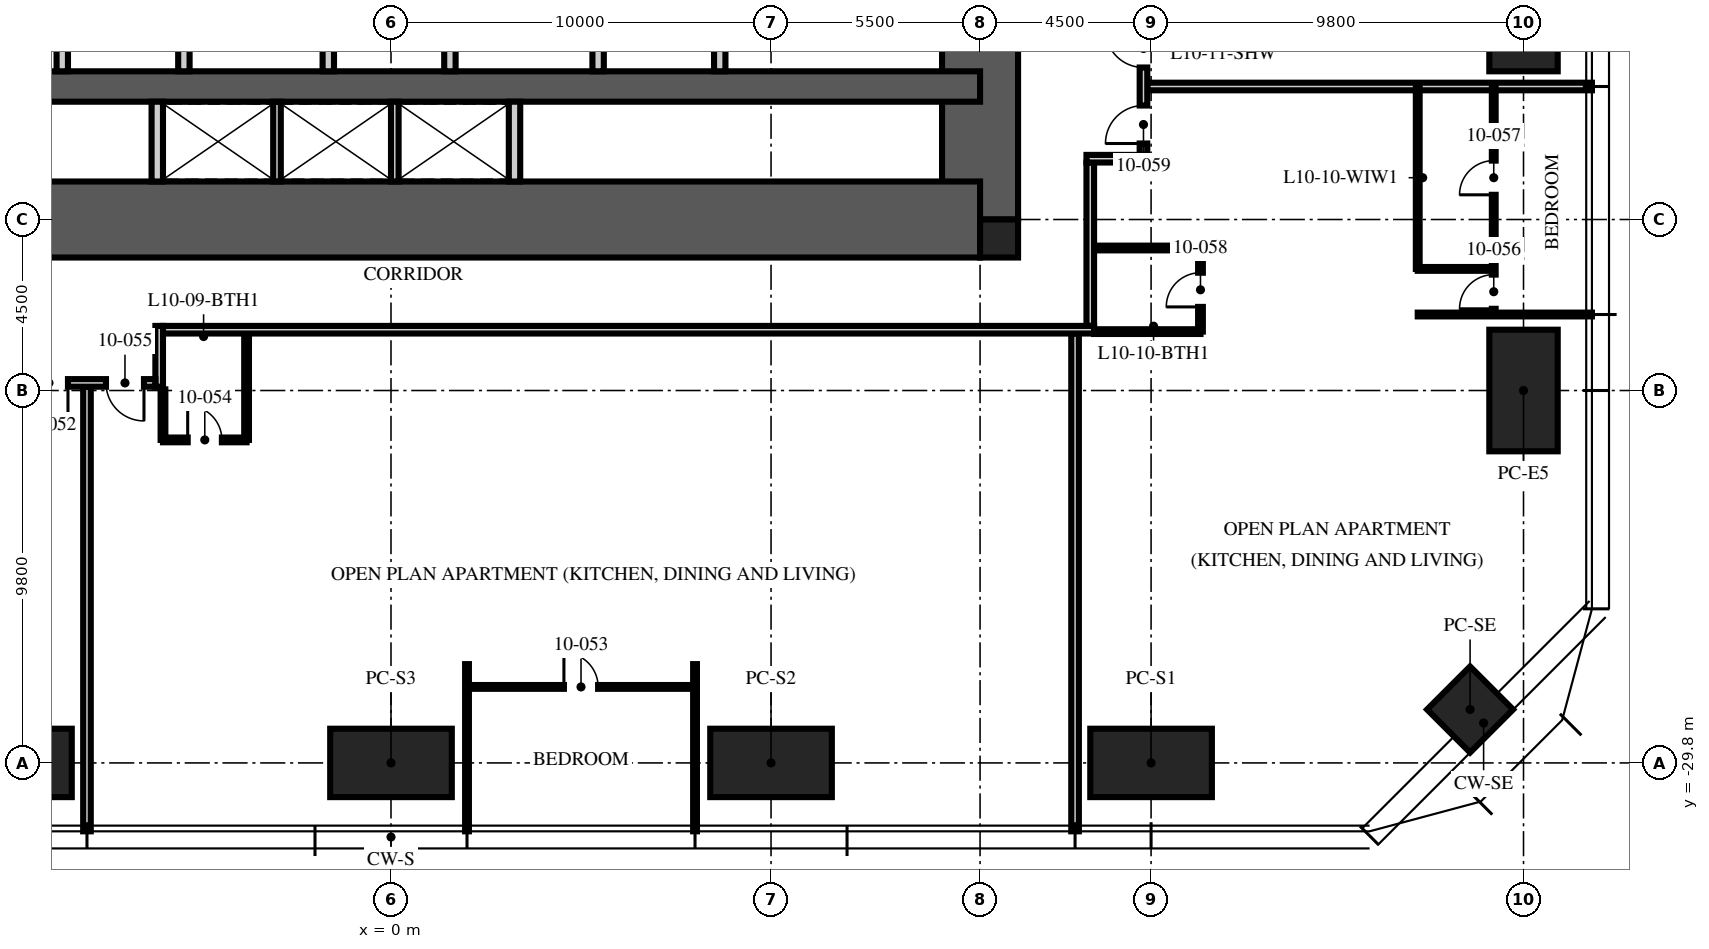
"""IFC4 building model, lengths in metres.
Left out: names, types, materials, properties, quantities, classifications, styles, units other than length and angle.
Written with IfcOpenShell. Run it as: python <this file> out.ifc"""

import sys

from ifc_helpers import new_model, si_unit, direction, frame, frame_2d, origin, origin_2d, place, context, subcontext, project, spatial, rectangle, hollow_rectangle, extrude, element, fill, save


model = new_model("IFC4")
c1 = context("Model", 3, precision=1e-05, world=origin(), true_north=direction((0.0, 1.0)))
c2 = subcontext(c1, "Body", "Model", "MODEL_VIEW")
j1 = project(units=[si_unit("LENGTHUNIT", "METRE"), si_unit("PLANEANGLEUNIT", "RADIAN")], contexts=[c1])
p1 = place(None, origin())
s1 = spatial("IfcSite", under=j1, at=p1, CompositionType="ELEMENT")
p2 = place(p1, origin())
s2 = spatial("IfcBuilding", under=s1, at=p2, CompositionType="ELEMENT")
p3 = place(p2, frame((0.0, 0.0, 43.5)))
s3 = spatial("IfcBuildingStorey", under=s2, at=p3, CompositionType="ELEMENT", Elevation=43.5)
p4 = place(p3, frame((15.5, -15.5, -0.25), z_axis=(0.0, 0.0, 1.0), x_axis=(0.0, 1.0, 0.0)))
e1 = element("IfcWall", 1, at=p4, inside=s3, PredefinedType="SHEAR", context=c2, shape_type="SweptSolid", body=[
    extrude(rectangle(XDim=31.0, YDim=2.0, at=frame_2d((15.5, 0.0))), origin(), (0.0, 0.0, 1.0), 3.75),
])
p5 = place(p4, frame((6.5, 0.0, 0.25)))
e2 = element("IfcOpeningElement", 2, at=p5, cuts=e1, PredefinedType="OPENING", context=c2, shape_type="SweptSolid", body=[
    extrude(rectangle(XDim=1.2, YDim=2.1, at=frame_2d((0.6, 1.05))), frame((0.0, 1.01, 0.0), z_axis=(0.0, -1.0, 0.0), x_axis=(1.0, 0.0, 0.0)), (0.0, 0.0, 1.0), 2.02),
])
p6 = place(p4, frame((23.0, 0.0, 0.25)))
e3 = element("IfcOpeningElement", 3, at=p6, cuts=e1, PredefinedType="OPENING", context=c2, shape_type="SweptSolid", body=[
    extrude(rectangle(XDim=1.8, YDim=2.1, at=frame_2d((0.9, 1.05))), frame((0.0, 1.01, 0.0), z_axis=(0.0, -1.0, 0.0), x_axis=(1.0, 0.0, 0.0)), (0.0, 0.0, 1.0), 2.02),
])
p7 = place(p3, frame((-15.5, -15.5, -0.25), z_axis=(0.0, 0.0, 1.0), x_axis=(1.0, 0.0, 0.0)))
e4 = element("IfcWall", 4, at=p7, inside=s3, PredefinedType="SHEAR", context=c2, shape_type="SweptSolid", body=[
    extrude(rectangle(XDim=31.0, YDim=2.0, at=frame_2d((15.5, 0.0))), origin(), (0.0, 0.0, 1.0), 3.75),
])
p8 = place(p3, frame((-15.5, -12.0, -0.25), z_axis=(0.0, 0.0, 1.0), x_axis=(1.0, 0.0, 0.0)))
e5 = element("IfcWall", 5, at=p8, inside=s3, PredefinedType="SHEAR", context=c2, shape_type="SweptSolid", body=[
    extrude(rectangle(XDim=31.0, YDim=0.8, at=frame_2d((15.5, 0.0))), origin(), (0.0, 0.0, 1.0), 3.75),
])
p9 = place(p3, frame((16.0, -16.0, -0.25), z_axis=(0.0, 0.0, 1.0), x_axis=(1.0, 0.0, 0.0)))
e6 = element("IfcColumn", 6, at=p9, inside=s3, PredefinedType="COLUMN", context=c2, shape_type="SweptSolid", body=[
    extrude(rectangle(XDim=1.0, YDim=1.0, at=origin_2d()), origin(), (0.0, 0.0, 1.0), 3.75),
])
for number, where, z_axis, x_axis in (
    (7, (29.8, -10.0, 0.0), (0.0, 0.0, 1.0), (0.0, 1.0, 0.0)),
    (8, (29.8, -20.0, 0.0), (0.0, 0.0, 1.0), (0.0, 1.0, 0.0)),
    (9, (20.0, -29.8, 0.0), (0.0, 0.0, 1.0), (1.0, 0.0, 0.0)),
    (10, (10.0, -29.8, 0.0), (0.0, 0.0, 1.0), (1.0, 0.0, 0.0)),
    (11, (0.0, -29.8, 0.0), (0.0, 0.0, 1.0), (1.0, 0.0, 0.0)),
    (12, (-10.0, -29.8, 0.0), (0.0, 0.0, 1.0), (1.0, 0.0, 0.0)),
):
    element("IfcColumn", number, at=place(p3, frame(where, z_axis=z_axis, x_axis=x_axis)), inside=s3, PredefinedType="COLUMN", context=c2, shape_type="SweptSolid", body=[
        extrude(hollow_rectangle(XDim=3.2, YDim=1.8, WallThickness=0.2, at=origin_2d()), origin(), (0.0, 0.0, 1.0), 3.75),
    ])
p10 = place(p3, frame((28.394, -28.394, 0.0), z_axis=(0.0, 0.0, 1.0), x_axis=(0.707106781187, 0.707106781187, 0.0)))
e13 = element("IfcColumn", 13, at=p10, inside=s3, PredefinedType="COLUMN", context=c2, shape_type="SweptSolid", body=[
    extrude(hollow_rectangle(XDim=1.6, YDim=1.6, WallThickness=0.1, at=origin_2d()), origin(), (0.0, 0.0, 1.0), 3.75),
])
p11 = place(p3, frame((-8.65, -11.6, 0.0), z_axis=(0.0, 0.0, 1.0), x_axis=(0.0, 1.0, 0.0)))
e14 = element("IfcWall", 14, at=p11, inside=s3, PredefinedType="PARTITIONING", context=c2, shape_type="SweptSolid", body=[
    extrude(rectangle(XDim=6.7, YDim=0.3, at=frame_2d((3.35, 0.0))), origin(), (0.0, 0.0, 1.0), 3.5),
])
p12 = place(p11, frame((2.85, 0.0, 0.0)))
e15 = element("IfcOpeningElement", 15, at=p12, cuts=e14, PredefinedType="OPENING", context=c2, shape_type="SweptSolid", body=[
    extrude(rectangle(XDim=1.1, YDim=2.1, at=frame_2d((0.55, 1.05))), frame((0.0, 0.16, 0.0), z_axis=(0.0, -1.0, 0.0), x_axis=(1.0, 0.0, 0.0)), (0.0, 0.0, 1.0), 0.32),
])
p13 = place(p3, frame((8.65, -11.6, 0.0), z_axis=(0.0, 0.0, 1.0), x_axis=(0.0, 1.0, 0.0)))
e16 = element("IfcWall", 16, at=p13, inside=s3, PredefinedType="PARTITIONING", context=c2, shape_type="SweptSolid", body=[
    extrude(rectangle(XDim=6.7, YDim=0.3, at=frame_2d((3.35, 0.0))), origin(), (0.0, 0.0, 1.0), 3.5),
])
p14 = place(p13, frame((2.85, 0.0, 0.0)))
e17 = element("IfcOpeningElement", 17, at=p14, cuts=e16, PredefinedType="OPENING", context=c2, shape_type="SweptSolid", body=[
    extrude(rectangle(XDim=1.1, YDim=2.1, at=frame_2d((0.55, 1.05))), frame((0.0, 0.16, 0.0), z_axis=(0.0, -1.0, 0.0), x_axis=(1.0, 0.0, 0.0)), (0.0, 0.0, 1.0), 0.32),
])
for number, where, z_axis, x_axis in (
    (18, (-5.45, -11.6, 0.0), (0.0, 0.0, 1.0), (0.0, 1.0, 0.0)),
    (19, (-1.65, -11.6, 0.0), (0.0, 0.0, 1.0), (0.0, 1.0, 0.0)),
    (20, (1.55, -11.6, 0.0), (0.0, 0.0, 1.0), (0.0, 1.0, 0.0)),
    (21, (5.45, -11.6, 0.0), (0.0, 0.0, 1.0), (0.0, 1.0, 0.0)),
):
    element("IfcWall", number, at=place(p3, frame(where, z_axis=z_axis, x_axis=x_axis)), inside=s3, PredefinedType="PARTITIONING", context=c2, shape_type="SweptSolid", body=[
        extrude(rectangle(XDim=4.8, YDim=0.3, at=frame_2d((2.4, 0.0))), origin(), (0.0, 0.0, 1.0), 3.5),
    ])
for number, where, z_axis, x_axis in (
    (22, (-6.15, -14.5, 0.0), (0.0, 0.0, 1.0), (0.0, 1.0, 0.0)),
    (23, (3.25, -14.5, 0.0), (0.0, 0.0, 1.0), (0.0, 1.0, 0.0)),
):
    element("IfcWall", number, at=place(p3, frame(where, z_axis=z_axis, x_axis=x_axis)), inside=s3, PredefinedType="PARTITIONING", context=c2, shape_type="SweptSolid", body=[
        extrude(rectangle(XDim=2.1, YDim=0.3, at=frame_2d((1.05, 0.0))), origin(), (0.0, 0.0, 1.0), 3.5),
    ])
for number, where, z_axis, x_axis in (
    (24, (-3.0, -14.5, 0.0), (0.0, 0.0, 1.0), (0.0, 1.0, 0.0)),
    (25, (0.1, -14.5, 0.0), (0.0, 0.0, 1.0), (0.0, 1.0, 0.0)),
):
    element("IfcWall", number, at=place(p3, frame(where, z_axis=z_axis, x_axis=x_axis)), inside=s3, PredefinedType="PARTITIONING", context=c2, shape_type="SweptSolid", body=[
        extrude(rectangle(XDim=2.1, YDim=0.2, at=frame_2d((1.05, 0.0))), origin(), (0.0, 0.0, 1.0), 3.5),
    ])
p15 = place(p3, frame((-8.0, -19.9, 0.0), z_axis=(0.0, 0.0, 1.0), x_axis=(0.0, -1.0, 0.0)))
e26 = element("IfcWall", 26, at=p15, inside=s3, PredefinedType="PARTITIONING", context=c2, shape_type="SweptSolid", body=[
    extrude(rectangle(XDim=11.7, YDim=0.2, at=frame_2d((5.85, 0.0))), origin(), (0.0, 0.0, 1.0), 2.71),
])
for number, where, z_axis, x_axis in (
    (27, (2.0, -27.2, 0.0), (0.0, 0.0, 1.0), (0.0, -1.0, 0.0)),
    (28, (8.0, -27.2, 0.0), (0.0, 0.0, 1.0), (0.0, -1.0, 0.0)),
):
    element("IfcWall", number, at=place(p3, frame(where, z_axis=z_axis, x_axis=x_axis)), inside=s3, PredefinedType="PARTITIONING", context=c2, shape_type="SweptSolid", body=[
        extrude(rectangle(XDim=4.4, YDim=0.1, at=frame_2d((2.2, 0.0))), origin(), (0.0, 0.0, 1.0), 2.71),
    ])
p16 = place(p3, frame((18.0, -18.5, 0.0), z_axis=(0.0, 0.0, 1.0), x_axis=(0.0, -1.0, 0.0)))
e29 = element("IfcWall", 29, at=p16, inside=s3, PredefinedType="PARTITIONING", context=c2, shape_type="SweptSolid", body=[
    extrude(rectangle(XDim=13.1, YDim=0.2, at=frame_2d((6.55, 0.0))), origin(), (0.0, 0.0, 1.0), 2.3),
])
p17 = place(p3, frame((27.017, -18.0, 0.0), z_axis=(0.0, 0.0, 1.0), x_axis=(1.0, 0.0, 0.0)))
e30 = element("IfcWall", 30, at=p17, inside=s3, PredefinedType="PARTITIONING", context=c2, shape_type="SweptSolid", body=[
    extrude(rectangle(XDim=4.583, YDim=0.1, at=frame_2d((2.292, 0.0))), origin(), (0.0, 0.0, 1.0), 2.71),
])
p18 = place(p3, frame((19.9, -12.0, 0.0), z_axis=(0.0, 0.0, 1.0), x_axis=(1.0, 0.0, 0.0)))
e31 = element("IfcWall", 31, at=p18, inside=s3, PredefinedType="PARTITIONING", context=c2, shape_type="SweptSolid", body=[
    extrude(rectangle(XDim=11.7, YDim=0.2, at=frame_2d((5.85, 0.0))), origin(), (0.0, 0.0, 1.0), 2.71),
])
p19 = place(p3, frame((2.0, -27.8, 0.0), z_axis=(0.0, 0.0, 1.0), x_axis=(1.0, 0.0, 0.0)))
e32 = element("IfcWall", 32, at=p19, inside=s3, PredefinedType="PARTITIONING", context=c2, shape_type="SweptSolid", body=[
    extrude(rectangle(XDim=6.0, YDim=0.1, at=frame_2d((3.0, 0.0))), origin(), (0.0, 0.0, 1.0), 2.61),
])
p20 = place(p19, frame((2.55, 0.0, 0.0)))
e33 = element("IfcOpeningElement", 33, at=p20, cuts=e32, PredefinedType="OPENING", context=c2, shape_type="SweptSolid", body=[
    extrude(rectangle(XDim=0.9, YDim=2.1, at=frame_2d((0.45, 1.05))), frame((0.0, 0.06, 0.0), z_axis=(0.0, -1.0, 0.0), x_axis=(1.0, 0.0, 0.0)), (0.0, 0.0, 1.0), 0.12),
])
p21 = place(p3, frame((-6.0, -21.3, 0.0), z_axis=(0.0, 0.0, 1.0), x_axis=(1.0, 0.0, 0.0)))
e34 = element("IfcWall", 34, at=p21, inside=s3, PredefinedType="PARTITIONING", context=c2, shape_type="SweptSolid", body=[
    extrude(rectangle(XDim=2.2, YDim=0.125, at=frame_2d((1.1, 0.0))), origin(), (0.0, 0.0, 1.0), 2.61),
])
p22 = place(p21, frame((0.65, 0.0, 0.0)))
e35 = element("IfcOpeningElement", 35, at=p22, cuts=e34, PredefinedType="OPENING", context=c2, shape_type="SweptSolid", body=[
    extrude(rectangle(XDim=0.9, YDim=2.1, at=frame_2d((0.45, 1.05))), frame((0.0, 0.073, 0.0), z_axis=(0.0, -1.0, 0.0), x_axis=(1.0, 0.0, 0.0)), (0.0, 0.0, 1.0), 0.145),
])
p23 = place(p3, frame((-6.0, -19.97, 0.0), z_axis=(0.0, 0.0, 1.0), x_axis=(0.0, -1.0, 0.0)))
e36 = element("IfcWall", 36, at=p23, inside=s3, PredefinedType="PARTITIONING", context=c2, shape_type="SweptSolid", body=[
    extrude(rectangle(XDim=1.33, YDim=0.125, at=frame_2d((0.665, 0.0))), origin(), (0.0, 0.0, 1.0), 3.5),
])
p24 = place(p3, frame((-3.8, -18.5, 0.0), z_axis=(0.0, 0.0, 1.0), x_axis=(0.0, -1.0, 0.0)))
e37 = element("IfcWall", 37, at=p24, inside=s3, PredefinedType="PARTITIONING", context=c2, shape_type="SweptSolid", body=[
    extrude(rectangle(XDim=2.8, YDim=0.125, at=frame_2d((1.4, 0.0))), origin(), (0.0, 0.0, 1.0), 3.5),
])
p25 = place(p3, frame((29.017, -18.0, 0.0), z_axis=(0.0, 0.0, 1.0), x_axis=(0.0, 1.0, 0.0)))
e38 = element("IfcWall", 38, at=p25, inside=s3, PredefinedType="PARTITIONING", context=c2, shape_type="SweptSolid", body=[
    extrude(rectangle(XDim=6.0, YDim=0.1, at=frame_2d((3.0, 0.0))), origin(), (0.0, 0.0, 1.0), 2.61),
])
p26 = place(p25, frame((0.15, 0.0, 0.0)))
e39 = element("IfcOpeningElement", 39, at=p26, cuts=e38, PredefinedType="OPENING", context=c2, shape_type="SweptSolid", body=[
    extrude(rectangle(XDim=0.9, YDim=2.1, at=frame_2d((0.45, 1.05))), frame((0.0, 0.06, 0.0), z_axis=(0.0, -1.0, 0.0), x_axis=(1.0, 0.0, 0.0)), (0.0, 0.0, 1.0), 0.12),
])
p27 = place(p25, frame((3.15, 0.0, 0.0)))
e40 = element("IfcOpeningElement", 40, at=p27, cuts=e38, PredefinedType="OPENING", context=c2, shape_type="SweptSolid", body=[
    extrude(rectangle(XDim=0.9, YDim=2.1, at=frame_2d((0.45, 1.05))), frame((0.0, 0.06, 0.0), z_axis=(0.0, -1.0, 0.0), x_axis=(1.0, 0.0, 0.0)), (0.0, 0.0, 1.0), 0.12),
])
p28 = place(p3, frame((27.017, -16.8, 0.0), z_axis=(0.0, 0.0, 1.0), x_axis=(1.0, 0.0, 0.0)))
e41 = element("IfcWall", 41, at=p28, inside=s3, PredefinedType="PARTITIONING", context=c2, shape_type="SweptSolid", body=[
    extrude(rectangle(XDim=2.0, YDim=0.1, at=frame_2d((1.0, 0.0))), origin(), (0.0, 0.0, 1.0), 3.5),
])
p29 = place(p3, frame((27.017, -16.8, 0.0), z_axis=(0.0, 0.0, 1.0), x_axis=(0.0, 1.0, 0.0)))
e42 = element("IfcWall", 42, at=p29, inside=s3, PredefinedType="PARTITIONING", context=c2, shape_type="SweptSolid", body=[
    extrude(rectangle(XDim=4.8, YDim=0.1, at=frame_2d((2.4, 0.0))), origin(), (0.0, 0.0, 1.0), 2.61),
])
p30 = place(p3, frame((21.3, -18.45, 0.0), z_axis=(0.0, 0.0, 1.0), x_axis=(0.0, 1.0, 0.0)))
e43 = element("IfcWall", 43, at=p30, inside=s3, PredefinedType="PARTITIONING", context=c2, shape_type="SweptSolid", body=[
    extrude(rectangle(XDim=2.2, YDim=0.125, at=frame_2d((1.1, 0.0))), origin(), (0.0, 0.0, 1.0), 3.5),
])
p31 = place(p30, frame((0.65, 0.0, 0.0)))
e44 = element("IfcOpeningElement", 44, at=p31, cuts=e43, PredefinedType="OPENING", context=c2, shape_type="SweptSolid", body=[
    extrude(rectangle(XDim=0.9, YDim=2.1, at=frame_2d((0.45, 1.05))), frame((0.0, 0.073, 0.0), z_axis=(0.0, -1.0, 0.0), x_axis=(1.0, 0.0, 0.0)), (0.0, 0.0, 1.0), 0.145),
])
p32 = place(p3, frame((18.5, -18.45, 0.0), z_axis=(0.0, 0.0, 1.0), x_axis=(1.0, 0.0, 0.0)))
e45 = element("IfcWall", 45, at=p32, inside=s3, PredefinedType="PARTITIONING", context=c2, shape_type="SweptSolid", body=[
    extrude(rectangle(XDim=2.8, YDim=0.125, at=frame_2d((1.4, 0.0))), origin(), (0.0, 0.0, 1.0), 2.3),
])
p33 = place(p3, frame((18.5, -16.25, 0.0), z_axis=(0.0, 0.0, 1.0), x_axis=(1.0, 0.0, 0.0)))
e46 = element("IfcWall", 46, at=p33, inside=s3, PredefinedType="PARTITIONING", context=c2, shape_type="SweptSolid", body=[
    extrude(rectangle(XDim=2.8, YDim=0.125, at=frame_2d((1.4, 0.0))), origin(), (0.0, 0.0, 1.0), 3.5),
])
p34 = place(p3, frame((18.4, -18.3, 0.0), z_axis=(0.0, 0.0, 1.0), x_axis=(0.0, 1.0, 0.0)))
e47 = element("IfcWall", 47, at=p34, inside=s3, PredefinedType="PARTITIONING", context=c2, shape_type="SweptSolid", body=[
    extrude(rectangle(XDim=4.3, YDim=0.2, at=frame_2d((2.15, 0.0))), origin(), (0.0, 0.0, 1.0), 2.3),
])
p35 = place(p3, frame((18.3, -13.9, 0.0), z_axis=(0.0, 0.0, 1.0), x_axis=(1.0, 0.0, 0.0)))
e48 = element("IfcWall", 48, at=p35, inside=s3, PredefinedType="PARTITIONING", context=c2, shape_type="SweptSolid", body=[
    extrude(rectangle(XDim=1.6, YDim=0.2, at=frame_2d((0.8, 0.0))), origin(), (0.0, 0.0, 1.0), 3.5),
])
p36 = place(p3, frame((19.8, -13.8, 0.0), z_axis=(0.0, 0.0, 1.0), x_axis=(0.0, 1.0, 0.0)))
e49 = element("IfcWall", 49, at=p36, inside=s3, PredefinedType="PARTITIONING", context=c2, shape_type="SweptSolid", body=[
    extrude(rectangle(XDim=3.6, YDim=0.2, at=frame_2d((1.8, 0.0))), origin(), (0.0, 0.0, 1.0), 3.5),
])
p37 = place(p36, frame((0.3, 0.0, 0.0)))
e50 = element("IfcOpeningElement", 50, at=p37, cuts=e49, PredefinedType="OPENING", context=c2, shape_type="SweptSolid", body=[
    extrude(rectangle(XDim=1.0, YDim=2.2, at=frame_2d((0.5, 1.1))), frame((0.0, 0.11, 0.0), z_axis=(0.0, -1.0, 0.0), x_axis=(1.0, 0.0, 0.0)), (0.0, 0.0, 1.0), 0.22),
])
p38 = place(p36, frame((2.3, 0.0, 0.0)))
e51 = element("IfcOpeningElement", 51, at=p38, cuts=e49, PredefinedType="OPENING", context=c2, shape_type="SweptSolid", body=[
    extrude(rectangle(XDim=1.0, YDim=2.2, at=frame_2d((0.5, 1.1))), frame((0.0, 0.11, 0.0), z_axis=(0.0, -1.0, 0.0), x_axis=(1.0, 0.0, 0.0)), (0.0, 0.0, 1.0), 0.22),
])
p39 = place(p3, frame((18.5, -18.4, 0.0), z_axis=(0.0, 0.0, 1.0), x_axis=(-1.0, 0.0, 0.0)))
e52 = element("IfcWall", 52, at=p39, inside=s3, PredefinedType="PARTITIONING", context=c2, shape_type="SweptSolid", body=[
    extrude(rectangle(XDim=24.5, YDim=0.2, at=frame_2d((12.25, 0.0))), origin(), (0.0, 0.0, 1.0), 2.3),
])
p40 = place(p3, frame((-6.1, -18.3, 0.0), z_axis=(0.0, 0.0, 1.0), x_axis=(0.0, -1.0, 0.0)))
e53 = element("IfcWall", 53, at=p40, inside=s3, PredefinedType="PARTITIONING", context=c2, shape_type="SweptSolid", body=[
    extrude(rectangle(XDim=1.6, YDim=0.2, at=frame_2d((0.8, 0.0))), origin(), (0.0, 0.0, 1.0), 3.5),
])
p41 = place(p3, frame((-6.2, -19.8, 0.0), z_axis=(0.0, 0.0, 1.0), x_axis=(-1.0, 0.0, 0.0)))
e54 = element("IfcWall", 54, at=p41, inside=s3, PredefinedType="PARTITIONING", context=c2, shape_type="SweptSolid", body=[
    extrude(rectangle(XDim=3.6, YDim=0.2, at=frame_2d((1.8, 0.0))), origin(), (0.0, 0.0, 1.0), 3.5),
])
p42 = place(p41, frame((2.3, 0.0, 0.0)))
e55 = element("IfcOpeningElement", 55, at=p42, cuts=e54, PredefinedType="OPENING", context=c2, shape_type="SweptSolid", body=[
    extrude(rectangle(XDim=1.0, YDim=2.2, at=frame_2d((0.5, 1.1))), frame((0.0, 0.11, 0.0), z_axis=(0.0, -1.0, 0.0), x_axis=(1.0, 0.0, 0.0)), (0.0, 0.0, 1.0), 0.22),
])
p43 = place(p41, frame((0.3, 0.0, 0.0)))
e56 = element("IfcOpeningElement", 56, at=p43, cuts=e54, PredefinedType="OPENING", context=c2, shape_type="SweptSolid", body=[
    extrude(rectangle(XDim=1.0, YDim=2.2, at=frame_2d((0.5, 1.1))), frame((0.0, 0.11, 0.0), z_axis=(0.0, -1.0, 0.0), x_axis=(1.0, 0.0, 0.0)), (0.0, 0.0, 1.0), 0.22),
])
p44 = place(p42, origin())
e57 = element("IfcDoor", 57, at=p44, inside=s3, OperationType="SINGLE_SWING_LEFT", PredefinedType="DOOR", context=c2, shape_type="SweptSolid", body=[
    extrude(rectangle(XDim=1.0, YDim=2.2, at=frame_2d((0.5, 1.1))), frame((0.0, 0.025, 0.0), z_axis=(0.0, -1.0, 0.0), x_axis=(1.0, 0.0, 0.0)), (0.0, 0.0, 1.0), 0.05),
])
fill(e55, e57)
p45 = place(p20, origin())
e58 = element("IfcDoor", 58, at=p45, inside=s3, OperationType="SINGLE_SWING_LEFT", PredefinedType="DOOR", context=c2, shape_type="SweptSolid", body=[
    extrude(rectangle(XDim=0.9, YDim=2.1, at=frame_2d((0.45, 1.05))), frame((0.0, 0.025, 0.0), z_axis=(0.0, -1.0, 0.0), x_axis=(1.0, 0.0, 0.0)), (0.0, 0.0, 1.0), 0.05),
])
fill(e33, e58)
p46 = place(p22, origin())
e59 = element("IfcDoor", 59, at=p46, inside=s3, OperationType="SINGLE_SWING_LEFT", PredefinedType="DOOR", context=c2, shape_type="SweptSolid", body=[
    extrude(rectangle(XDim=0.9, YDim=2.1, at=frame_2d((0.45, 1.05))), frame((0.0, 0.025, 0.0), z_axis=(0.0, -1.0, 0.0), x_axis=(1.0, 0.0, 0.0)), (0.0, 0.0, 1.0), 0.05),
])
fill(e35, e59)
p47 = place(p43, origin())
e60 = element("IfcDoor", 60, at=p47, inside=s3, OperationType="SINGLE_SWING_LEFT", PredefinedType="DOOR", context=c2, shape_type="SweptSolid", body=[
    extrude(rectangle(XDim=1.0, YDim=2.2, at=frame_2d((0.5, 1.1))), frame((0.0, 0.025, 0.0), z_axis=(0.0, -1.0, 0.0), x_axis=(1.0, 0.0, 0.0)), (0.0, 0.0, 1.0), 0.05),
])
fill(e56, e60)
p48 = place(p26, origin())
e61 = element("IfcDoor", 61, at=p48, inside=s3, OperationType="SINGLE_SWING_LEFT", PredefinedType="DOOR", context=c2, shape_type="SweptSolid", body=[
    extrude(rectangle(XDim=0.9, YDim=2.1, at=frame_2d((0.45, 1.05))), frame((0.0, 0.025, 0.0), z_axis=(0.0, -1.0, 0.0), x_axis=(1.0, 0.0, 0.0)), (0.0, 0.0, 1.0), 0.05),
])
fill(e39, e61)
p49 = place(p27, origin())
e62 = element("IfcDoor", 62, at=p49, inside=s3, OperationType="SINGLE_SWING_LEFT", PredefinedType="DOOR", context=c2, shape_type="SweptSolid", body=[
    extrude(rectangle(XDim=0.9, YDim=2.1, at=frame_2d((0.45, 1.05))), frame((0.0, 0.025, 0.0), z_axis=(0.0, -1.0, 0.0), x_axis=(1.0, 0.0, 0.0)), (0.0, 0.0, 1.0), 0.05),
])
fill(e40, e62)
p50 = place(p31, origin())
e63 = element("IfcDoor", 63, at=p50, inside=s3, OperationType="SINGLE_SWING_LEFT", PredefinedType="DOOR", context=c2, shape_type="SweptSolid", body=[
    extrude(rectangle(XDim=0.9, YDim=2.1, at=frame_2d((0.45, 1.05))), frame((0.0, 0.025, 0.0), z_axis=(0.0, -1.0, 0.0), x_axis=(1.0, 0.0, 0.0)), (0.0, 0.0, 1.0), 0.05),
])
fill(e44, e63)
p51 = place(p37, origin())
e64 = element("IfcDoor", 64, at=p51, inside=s3, OperationType="SINGLE_SWING_LEFT", PredefinedType="DOOR", context=c2, shape_type="SweptSolid", body=[
    extrude(rectangle(XDim=1.0, YDim=2.2, at=frame_2d((0.5, 1.1))), frame((0.0, 0.025, 0.0), z_axis=(0.0, -1.0, 0.0), x_axis=(1.0, 0.0, 0.0)), (0.0, 0.0, 1.0), 0.05),
])
fill(e50, e64)
p52 = place(p38, origin())
e65 = element("IfcDoor", 65, at=p52, inside=s3, OperationType="SINGLE_SWING_RIGHT", PredefinedType="DOOR", context=c2, shape_type="SweptSolid", body=[
    extrude(rectangle(XDim=1.0, YDim=2.2, at=frame_2d((0.5, 1.1))), frame((0.0, 0.025, 0.0), z_axis=(0.0, -1.0, 0.0), x_axis=(1.0, 0.0, 0.0)), (0.0, 0.0, 1.0), 0.05),
])
fill(e51, e65)
save(model, sys.argv[1])
